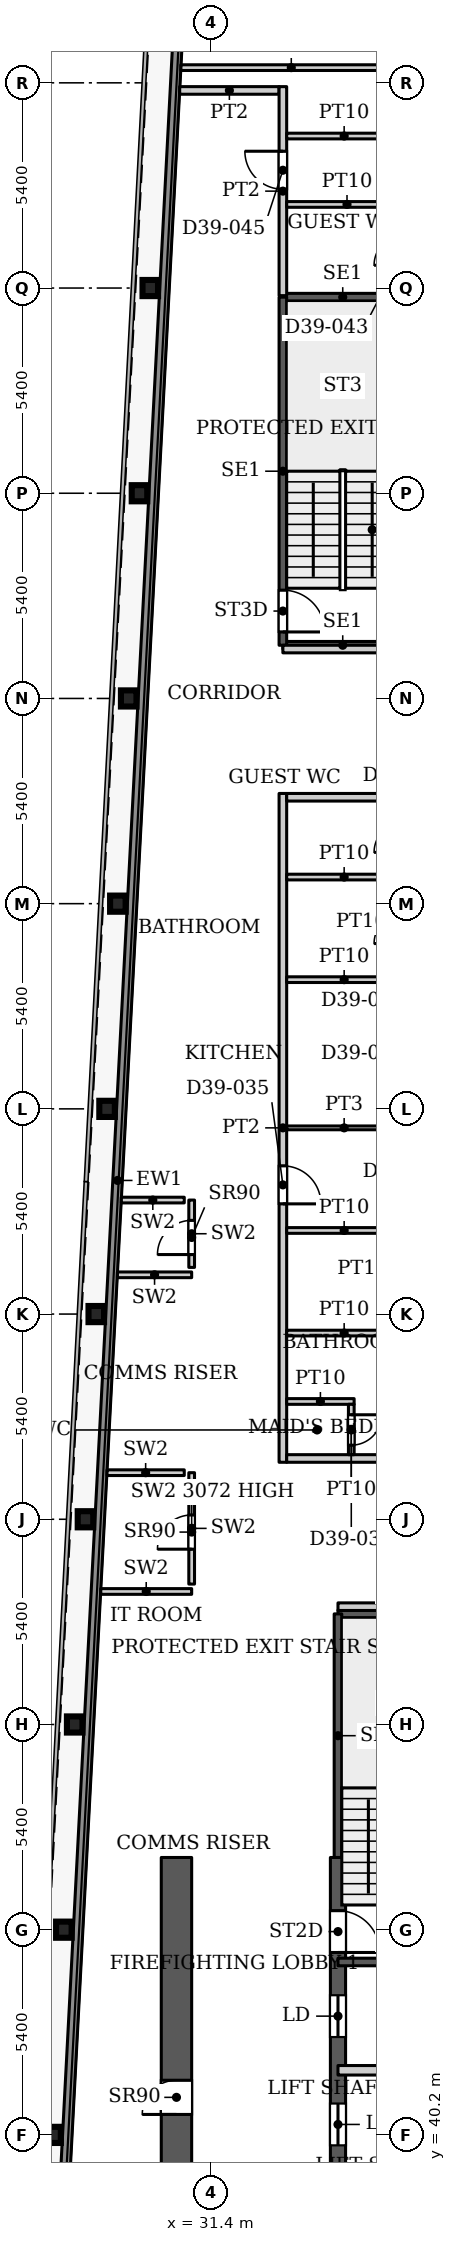
"""IFC4 building model, lengths in metres.
Left out: names, types, materials, properties, quantities, classifications, styles, units other than length and angle.
Written with IfcOpenShell. Run it as: python <this file> out.ifc"""

import sys

from ifc_helpers import new_model, si_unit, direction, frame, frame_2d, origin, origin_2d, place, context, subcontext, project, spatial, rectangle, i_section, extrude, source, transform, mapped, element, fill, save


model = new_model("IFC4")
c1 = context("Model", 3, precision=1e-05, world=origin(), true_north=direction((0.0, 1.0)))
c2 = subcontext(c1, "Body", "Model", "MODEL_VIEW")
j1 = project(units=[si_unit("LENGTHUNIT", "METRE"), si_unit("PLANEANGLEUNIT", "RADIAN")], contexts=[c1])
p1 = place(None, origin())
s1 = spatial("IfcSite", under=j1, at=p1, CompositionType="ELEMENT")
p2 = place(p1, origin())
s2 = spatial("IfcBuilding", under=s1, at=p2, CompositionType="ELEMENT")
p3 = place(p2, frame((0.0, 0.0, 172.1)))
s3 = spatial("IfcBuildingStorey", under=s2, at=p3, CompositionType="ELEMENT", Elevation=172.1)
for number, where, z_axis, x_axis in (
    (1, (27.253, 40.2, 0.0), (0.0, 0.0, 1.0), (1.0, 0.0, 0.0)),
    (2, (27.537, 45.6, 0.0), (0.0, 0.0, 1.0), (1.0, 0.0, 0.0)),
    (3, (27.822, 51.0, 0.0), (0.0, 0.0, 1.0), (1.0, 0.0, 0.0)),
    (4, (28.106, 56.4, 0.0), (0.0, 0.0, 1.0), (1.0, 0.0, 0.0)),
    (5, (28.39, 61.8, 0.0), (0.0, 0.0, 1.0), (1.0, 0.0, 0.0)),
    (6, (28.674, 67.2, 0.0), (0.0, 0.0, 1.0), (1.0, 0.0, 0.0)),
    (7, (28.958, 72.6, 0.0), (0.0, 0.0, 1.0), (1.0, 0.0, 0.0)),
    (8, (29.243, 78.0, 0.0), (0.0, 0.0, 1.0), (1.0, 0.0, 0.0)),
    (9, (29.527, 83.4, 0.0), (0.0, 0.0, 1.0), (1.0, 0.0, 0.0)),
    (10, (29.811, 88.8, 0.0), (0.0, 0.0, 1.0), (1.0, 0.0, 0.0)),
):
    element("IfcColumn", number, at=place(p3, frame(where, z_axis=z_axis, x_axis=x_axis)), inside=s3, PredefinedType="COLUMN", context=c2, shape_type="SweptSolid", body=[
        extrude(i_section(OverallWidth=0.409, OverallDepth=0.425, WebThickness=0.033, FlangeThickness=0.052, FilletRadius=0.013, at=origin_2d()), origin(), (0.0, 0.0, 1.0), 3.9),
    ])
p4 = place(p3, frame((34.75, 29.05, 0.0), z_axis=(0.0, 0.0, 1.0), x_axis=(0.0, 1.0, 0.0)))
e11 = element("IfcWall", 11, at=p4, inside=s3, PredefinedType="SHEAR", context=c2, shape_type="SweptSolid", body=[
    extrude(rectangle(XDim=18.45, YDim=0.4, at=frame_2d((9.225, 0.0))), origin(), (0.0, 0.0, 1.0), 3.9),
])
p5 = place(p4, frame((8.025, 0.0, 0.0)))
e12 = element("IfcOpeningElement", 12, at=p5, cuts=e11, PredefinedType="OPENING", context=c2, shape_type="SweptSolid", body=[
    extrude(rectangle(XDim=1.1, YDim=2.2, at=frame_2d((0.55, 1.1))), frame((0.0, 0.21, 0.0), z_axis=(0.0, -1.0, 0.0), x_axis=(1.0, 0.0, 0.0)), (0.0, 0.0, 1.0), 0.42),
])
p6 = place(p4, frame((10.875, 0.0, 0.0)))
e13 = element("IfcOpeningElement", 13, at=p6, cuts=e11, PredefinedType="OPENING", context=c2, shape_type="SweptSolid", body=[
    extrude(rectangle(XDim=1.1, YDim=2.2, at=frame_2d((0.55, 1.1))), frame((0.0, 0.21, 0.0), z_axis=(0.0, -1.0, 0.0), x_axis=(1.0, 0.0, 0.0)), (0.0, 0.0, 1.0), 0.42),
])
p7 = place(p4, frame((13.725, 0.0, 0.0)))
e14 = element("IfcOpeningElement", 14, at=p7, cuts=e11, PredefinedType="OPENING", context=c2, shape_type="SweptSolid", body=[
    extrude(rectangle(XDim=1.1, YDim=2.2, at=frame_2d((0.55, 1.1))), frame((0.0, 0.21, 0.0), z_axis=(0.0, -1.0, 0.0), x_axis=(1.0, 0.0, 0.0)), (0.0, 0.0, 1.0), 0.42),
])
p8 = place(p4, frame((15.95, 0.0, 0.0)))
e15 = element("IfcOpeningElement", 15, at=p8, cuts=e11, PredefinedType="OPENING", context=c2, shape_type="SweptSolid", body=[
    extrude(rectangle(XDim=1.1, YDim=2.2, at=frame_2d((0.55, 1.1))), frame((0.0, 0.21, 0.0), z_axis=(0.0, -1.0, 0.0), x_axis=(1.0, 0.0, 0.0)), (0.0, 0.0, 1.0), 0.42),
])
p9 = place(p3, frame((30.5, 29.05, 0.0), z_axis=(0.0, 0.0, 1.0), x_axis=(0.0, 1.0, 0.0)))
e16 = element("IfcWall", 16, at=p9, inside=s3, PredefinedType="SHEAR", context=c2, shape_type="SweptSolid", body=[
    extrude(rectangle(XDim=18.45, YDim=0.8, at=frame_2d((9.225, 0.0))), origin(), (0.0, 0.0, 1.0), 3.9),
])
p10 = place(p9, frame((1.5, 0.0, 0.0)))
e17 = element("IfcOpeningElement", 17, at=p10, cuts=e16, PredefinedType="OPENING", context=c2, shape_type="SweptSolid", body=[
    extrude(rectangle(XDim=0.9, YDim=2.2, at=frame_2d((0.45, 1.1))), frame((0.0, 0.41, 0.0), z_axis=(0.0, -1.0, 0.0), x_axis=(1.0, 0.0, 0.0)), (0.0, 0.0, 1.0), 0.82),
])
p11 = place(p9, frame((7.406, 0.0, 0.0)))
e18 = element("IfcOpeningElement", 18, at=p11, cuts=e16, PredefinedType="OPENING", context=c2, shape_type="SweptSolid", body=[
    extrude(rectangle(XDim=0.9, YDim=2.2, at=frame_2d((0.45, 1.1))), frame((0.0, 0.41, 0.0), z_axis=(0.0, -1.0, 0.0), x_axis=(1.0, 0.0, 0.0)), (0.0, 0.0, 1.0), 0.82),
])
p12 = place(p9, frame((11.688, 0.0, 0.0)))
e19 = element("IfcOpeningElement", 19, at=p12, cuts=e16, PredefinedType="OPENING", context=c2, shape_type="SweptSolid", body=[
    extrude(rectangle(XDim=0.9, YDim=2.2, at=frame_2d((0.45, 1.1))), frame((0.0, 0.41, 0.0), z_axis=(0.0, -1.0, 0.0), x_axis=(1.0, 0.0, 0.0)), (0.0, 0.0, 1.0), 0.82),
])
p13 = place(p3, frame((27.195, 31.969, 0.0), z_axis=(0.0, 0.0, 1.0), x_axis=(0.052554995867, 0.998618031286, 0.0)))
e20 = element("IfcWall", 20, at=p13, inside=s3, PredefinedType="SOLIDWALL", context=c2, shape_type="SweptSolid", body=[
    extrude(rectangle(XDim=66.787, YDim=0.25, at=frame_2d((33.394, 0.0))), origin(), (0.0, 0.0, 1.0), 3.75),
])
for number, where, z_axis, x_axis in (
    (21, (34.75, 44.75, 0.0), (0.0, 0.0, 1.0), (1.0, 0.0, 0.0)),
    (22, (34.75, 53.91, 0.0), (0.0, 0.0, 1.0), (1.0, 0.0, 0.0)),
):
    element("IfcWall", number, at=place(p3, frame(where, z_axis=z_axis, x_axis=x_axis)), inside=s3, PredefinedType="SHEAR", context=c2, shape_type="SweptSolid", body=[
        extrude(rectangle(XDim=3.15, YDim=0.2, at=frame_2d((1.575, 0.0))), origin(), (0.0, 0.0, 1.0), 3.9),
    ])
p14 = place(p3, frame((34.75, 47.5, 0.0), z_axis=(0.0, 0.0, 1.0), x_axis=(0.0, 1.0, 0.0)))
e23 = element("IfcWall", 23, at=p14, inside=s3, PredefinedType="SHEAR", context=c2, shape_type="SweptSolid", body=[
    extrude(rectangle(XDim=6.41, YDim=0.2, at=frame_2d((3.205, 0.0))), origin(), (0.0, 0.0, 1.0), 3.9),
])
for number, where, z_axis, x_axis in (
    (24, (33.3, 79.4, 0.0), (0.0, 0.0, 1.0), (1.0, 0.0, 0.0)),
    (25, (33.3, 88.56, 0.0), (0.0, 0.0, 1.0), (1.0, 0.0, 0.0)),
):
    element("IfcWall", number, at=place(p3, frame(where, z_axis=z_axis, x_axis=x_axis)), inside=s3, PredefinedType="SHEAR", context=c2, shape_type="SweptSolid", body=[
        extrude(rectangle(XDim=3.15, YDim=0.2, at=frame_2d((1.575, 0.0))), origin(), (0.0, 0.0, 1.0), 3.9),
    ])
p15 = place(p3, frame((33.3, 79.4, 0.0), z_axis=(0.0, 0.0, 1.0), x_axis=(0.0, 1.0, 0.0)))
e26 = element("IfcWall", 26, at=p15, inside=s3, PredefinedType="SHEAR", context=c2, shape_type="SweptSolid", body=[
    extrude(rectangle(XDim=9.16, YDim=0.2, at=frame_2d((4.58, 0.0))), origin(), (0.0, 0.0, 1.0), 3.9),
])
p16 = place(p15, frame((0.35, 0.0, 0.0)))
e27 = element("IfcOpeningElement", 27, at=p16, cuts=e26, PredefinedType="OPENING", context=c2, shape_type="SweptSolid", body=[
    extrude(rectangle(XDim=1.1, YDim=2.2, at=frame_2d((0.55, 1.1))), frame((0.0, 0.11, 0.0), z_axis=(0.0, -1.0, 0.0), x_axis=(1.0, 0.0, 0.0)), (0.0, 0.0, 1.0), 0.22),
])
p17 = place(p3, frame((34.75, 41.9, 0.0), z_axis=(0.0, 0.0, 1.0), x_axis=(1.0, 0.0, 0.0)))
e28 = element("IfcWall", 28, at=p17, inside=s3, PredefinedType="PARTITIONING", context=c2, shape_type="SweptSolid", body=[
    extrude(rectangle(XDim=3.25, YDim=0.25, at=frame_2d((1.625, 0.0))), origin(), (0.0, 0.0, 1.0), 3.9),
])
p18 = place(p3, frame((28.508, 54.5, 0.0), z_axis=(0.0, 0.0, 1.0), x_axis=(1.0, 0.0, 0.0)))
e29 = element("IfcWall", 29, at=p18, inside=s3, PredefinedType="PARTITIONING", context=c2, shape_type="SweptSolid", body=[
    extrude(rectangle(XDim=2.392, YDim=0.15, at=frame_2d((1.196, 0.0))), origin(), (0.0, 0.0, 1.0), 3.9),
])
p19 = place(p3, frame((30.9, 54.695, 0.0), z_axis=(0.0, 0.0, 1.0), x_axis=(0.0, 1.0, 0.0)))
e30 = element("IfcWall", 30, at=p19, inside=s3, PredefinedType="PARTITIONING", context=c2, shape_type="SweptSolid", body=[
    extrude(rectangle(XDim=2.931, YDim=0.15, at=frame_2d((1.465, 0.0))), origin(), (0.0, 0.0, 1.0), 3.072),
])
p20 = place(p19, frame((0.918, 0.0, 0.0)))
e31 = element("IfcOpeningElement", 31, at=p20, cuts=e30, PredefinedType="OPENING", context=c2, shape_type="SweptSolid", body=[
    extrude(rectangle(XDim=0.9, YDim=2.2, at=frame_2d((0.45, 1.1))), frame((0.0, 0.085, 0.0), z_axis=(0.0, -1.0, 0.0), x_axis=(1.0, 0.0, 0.0)), (0.0, 0.0, 1.0), 0.17),
])
p21 = place(p3, frame((28.673, 57.626, 0.0), z_axis=(0.0, 0.0, 1.0), x_axis=(1.0, 0.0, 0.0)))
e32 = element("IfcWall", 32, at=p21, inside=s3, PredefinedType="PARTITIONING", context=c2, shape_type="SweptSolid", body=[
    extrude(rectangle(XDim=2.032, YDim=0.15, at=frame_2d((1.016, 0.0))), origin(), (0.0, 0.0, 1.0), 3.9),
])
p22 = place(p3, frame((28.947, 62.833, 0.0), z_axis=(0.0, 0.0, 1.0), x_axis=(1.0, 0.0, 0.0)))
e33 = element("IfcWall", 33, at=p22, inside=s3, PredefinedType="PARTITIONING", context=c2, shape_type="SweptSolid", body=[
    extrude(rectangle(XDim=1.953, YDim=0.15, at=frame_2d((0.977, 0.0))), origin(), (0.0, 0.0, 1.0), 3.9),
])
p23 = place(p3, frame((30.9, 63.028, 0.0), z_axis=(0.0, 0.0, 1.0), x_axis=(0.0, 1.0, 0.0)))
e34 = element("IfcWall", 34, at=p23, inside=s3, PredefinedType="PARTITIONING", context=c2, shape_type="SweptSolid", body=[
    extrude(rectangle(XDim=1.772, YDim=0.15, at=frame_2d((0.886, 0.0))), origin(), (0.0, 0.0, 1.0), 3.9),
])
p24 = place(p23, frame((0.338, 0.0, 0.0)))
e35 = element("IfcOpeningElement", 35, at=p24, cuts=e34, PredefinedType="OPENING", context=c2, shape_type="SweptSolid", body=[
    extrude(rectangle(XDim=0.9, YDim=2.2, at=frame_2d((0.45, 1.1))), frame((0.0, 0.085, 0.0), z_axis=(0.0, -1.0, 0.0), x_axis=(1.0, 0.0, 0.0)), (0.0, 0.0, 1.0), 0.17),
])
p25 = place(p3, frame((29.05, 64.8, 0.0), z_axis=(0.0, 0.0, 1.0), x_axis=(1.0, 0.0, 0.0)))
e36 = element("IfcWall", 36, at=p25, inside=s3, PredefinedType="PARTITIONING", context=c2, shape_type="SweptSolid", body=[
    extrude(rectangle(XDim=1.655, YDim=0.15, at=frame_2d((0.828, 0.0))), origin(), (0.0, 0.0, 1.0), 3.9),
])
p26 = place(p3, frame((30.617, 94.6, 0.0), z_axis=(0.0, 0.0, 1.0), x_axis=(1.0, 0.0, 0.0)))
e37 = element("IfcWall", 37, at=p26, inside=s3, PredefinedType="PARTITIONING", context=c2, shape_type="SweptSolid", body=[
    extrude(rectangle(XDim=5.808, YDim=0.15, at=frame_2d((2.904, 0.0))), origin(), (0.0, 0.0, 1.0), 3.6),
])
p27 = place(p3, frame((30.585, 94.0, 0.0), z_axis=(0.0, 0.0, 1.0), x_axis=(1.0, 0.0, 0.0)))
e38 = element("IfcWall", 38, at=p27, inside=s3, PredefinedType="PARTITIONING", context=c2, shape_type="SweptSolid", body=[
    extrude(rectangle(XDim=2.615, YDim=0.2, at=frame_2d((1.308, 0.0))), origin(), (0.0, 0.0, 1.0), 3.6),
])
p28 = place(p3, frame((33.3, 57.9, 0.0), z_axis=(0.0, 0.0, 1.0), x_axis=(0.0, 1.0, 0.0)))
e39 = element("IfcWall", 39, at=p28, inside=s3, PredefinedType="PARTITIONING", context=c2, shape_type="SweptSolid", body=[
    extrude(rectangle(XDim=17.6, YDim=0.2, at=frame_2d((8.8, 0.0))), origin(), (0.0, 0.0, 1.0), 3.6),
])
p29 = place(p28, frame((6.8, 0.0, 0.0)))
e40 = element("IfcOpeningElement", 40, at=p29, cuts=e39, PredefinedType="OPENING", context=c2, shape_type="SweptSolid", body=[
    extrude(rectangle(XDim=1.0, YDim=2.1, at=frame_2d((0.5, 1.05))), frame((0.0, 0.11, 0.0), z_axis=(0.0, -1.0, 0.0), x_axis=(1.0, 0.0, 0.0)), (0.0, 0.0, 1.0), 0.22),
])
p30 = place(p3, frame((33.3, 79.3, 0.0), z_axis=(0.0, 0.0, 1.0), x_axis=(1.0, 0.0, 0.0)))
e41 = element("IfcWall", 41, at=p30, inside=s3, PredefinedType="PARTITIONING", context=c2, shape_type="SweptSolid", body=[
    extrude(rectangle(XDim=12.6, YDim=0.2, at=frame_2d((6.3, 0.0))), origin(), (0.0, 0.0, 1.0), 3.6),
])
p31 = place(p30, frame((5.795, 0.0, 0.0)))
e42 = element("IfcOpeningElement", 42, at=p31, cuts=e41, PredefinedType="OPENING", context=c2, shape_type="SweptSolid", body=[
    extrude(rectangle(XDim=1.0, YDim=2.1, at=frame_2d((0.5, 1.05))), frame((0.0, 0.11, 0.0), z_axis=(0.0, -1.0, 0.0), x_axis=(1.0, 0.0, 0.0)), (0.0, 0.0, 1.0), 0.22),
])
p32 = place(p3, frame((33.3, 88.6, 0.0), z_axis=(0.0, 0.0, 1.0), x_axis=(0.0, 1.0, 0.0)))
e43 = element("IfcWall", 43, at=p32, inside=s3, PredefinedType="PARTITIONING", context=c2, shape_type="SweptSolid", body=[
    extrude(rectangle(XDim=5.5, YDim=0.2, at=frame_2d((2.75, 0.0))), origin(), (0.0, 0.0, 1.0), 3.6),
])
p33 = place(p32, frame((2.8, 0.0, 0.0)))
e44 = element("IfcOpeningElement", 44, at=p33, cuts=e43, PredefinedType="OPENING", context=c2, shape_type="SweptSolid", body=[
    extrude(rectangle(XDim=1.0, YDim=2.1, at=frame_2d((0.5, 1.05))), frame((0.0, 0.11, 0.0), z_axis=(0.0, -1.0, 0.0), x_axis=(1.0, 0.0, 0.0)), (0.0, 0.0, 1.0), 0.22),
])
p34 = place(p3, frame((33.4, 58.0, 0.0), z_axis=(0.0, 0.0, 1.0), x_axis=(1.0, 0.0, 0.0)))
e45 = element("IfcWall", 45, at=p34, inside=s3, PredefinedType="PARTITIONING", context=c2, shape_type="SweptSolid", body=[
    extrude(rectangle(XDim=12.5, YDim=0.2, at=frame_2d((6.25, 0.0))), origin(), (0.0, 0.0, 1.0), 3.6),
])
p35 = place(p3, frame((33.4, 59.5, 0.0), z_axis=(0.0, 0.0, 1.0), x_axis=(1.0, 0.0, 0.0)))
e46 = element("IfcWall", 46, at=p35, inside=s3, PredefinedType="PARTITIONING", context=c2, shape_type="SweptSolid", body=[
    extrude(rectangle(XDim=1.775, YDim=0.15, at=frame_2d((0.888, 0.0))), origin(), (0.0, 0.0, 1.0), 3.6),
])
for number, where, z_axis, x_axis in (
    (47, (33.4, 61.3, 0.0), (0.0, 0.0, 1.0), (1.0, 0.0, 0.0)),
    (48, (33.4, 64.0, 0.0), (0.0, 0.0, 1.0), (1.0, 0.0, 0.0)),
):
    element("IfcWall", number, at=place(p3, frame(where, z_axis=z_axis, x_axis=x_axis)), inside=s3, PredefinedType="PARTITIONING", context=c2, shape_type="SweptSolid", body=[
        extrude(rectangle(XDim=3.025, YDim=0.15, at=frame_2d((1.513, 0.0))), origin(), (0.0, 0.0, 1.0), 3.6),
    ])
p36 = place(p3, frame((33.4, 66.7, 0.0), z_axis=(0.0, 0.0, 1.0), x_axis=(1.0, 0.0, 0.0)))
e49 = element("IfcWall", 49, at=p36, inside=s3, PredefinedType="PARTITIONING", context=c2, shape_type="SweptSolid", body=[
    extrude(rectangle(XDim=3.025, YDim=0.1, at=frame_2d((1.513, 0.0))), origin(), (0.0, 0.0, 1.0), 3.6),
])
for number, where, z_axis, x_axis in (
    (50, (33.4, 70.6, 0.0), (0.0, 0.0, 1.0), (1.0, 0.0, 0.0)),
    (51, (33.4, 73.3, 0.0), (0.0, 0.0, 1.0), (1.0, 0.0, 0.0)),
):
    element("IfcWall", number, at=place(p3, frame(where, z_axis=z_axis, x_axis=x_axis)), inside=s3, PredefinedType="PARTITIONING", context=c2, shape_type="SweptSolid", body=[
        extrude(rectangle(XDim=3.025, YDim=0.15, at=frame_2d((1.513, 0.0))), origin(), (0.0, 0.0, 1.0), 3.6),
    ])
p37 = place(p3, frame((33.4, 75.4, 0.0), z_axis=(0.0, 0.0, 1.0), x_axis=(1.0, 0.0, 0.0)))
e52 = element("IfcWall", 52, at=p37, inside=s3, PredefinedType="PARTITIONING", context=c2, shape_type="SweptSolid", body=[
    extrude(rectangle(XDim=12.5, YDim=0.2, at=frame_2d((6.25, 0.0))), origin(), (0.0, 0.0, 1.0), 3.6),
])
p38 = place(p3, frame((33.4, 91.0, 0.0), z_axis=(0.0, 0.0, 1.0), x_axis=(1.0, 0.0, 0.0)))
e53 = element("IfcWall", 53, at=p38, inside=s3, PredefinedType="PARTITIONING", context=c2, shape_type="SweptSolid", body=[
    extrude(rectangle(XDim=3.175, YDim=0.15, at=frame_2d((1.587, 0.0))), origin(), (0.0, 0.0, 1.0), 3.6),
])
p39 = place(p3, frame((33.4, 92.8, 0.0), z_axis=(0.0, 0.0, 1.0), x_axis=(1.0, 0.0, 0.0)))
e54 = element("IfcWall", 54, at=p39, inside=s3, PredefinedType="PARTITIONING", context=c2, shape_type="SweptSolid", body=[
    extrude(rectangle(XDim=3.025, YDim=0.15, at=frame_2d((1.513, 0.0))), origin(), (0.0, 0.0, 1.0), 3.6),
])
p40 = place(p3, frame((34.75, 54.1, 0.0), z_axis=(0.0, 0.0, 1.0), x_axis=(1.0, 0.0, 0.0)))
e55 = element("IfcWall", 55, at=p40, inside=s3, PredefinedType="PARTITIONING", context=c2, shape_type="SweptSolid", body=[
    extrude(rectangle(XDim=11.15, YDim=0.2, at=frame_2d((5.575, 0.0))), origin(), (0.0, 0.0, 1.0), 3.6),
])
p41 = place(p40, frame((5.075, 0.0, 0.0)))
e56 = element("IfcOpeningElement", 56, at=p41, cuts=e55, PredefinedType="OPENING", context=c2, shape_type="SweptSolid", body=[
    extrude(rectangle(XDim=1.0, YDim=2.1, at=frame_2d((0.5, 1.05))), frame((0.0, 0.11, 0.0), z_axis=(0.0, -1.0, 0.0), x_axis=(1.0, 0.0, 0.0)), (0.0, 0.0, 1.0), 0.22),
])
p42 = place(p3, frame((35.1, 58.1, 0.0), z_axis=(0.0, 0.0, 1.0), x_axis=(0.0, 1.0, 0.0)))
e57 = element("IfcWall", 57, at=p42, inside=s3, PredefinedType="PARTITIONING", context=c2, shape_type="SweptSolid", body=[
    extrude(rectangle(XDim=1.325, YDim=0.15, at=frame_2d((0.663, 0.0))), origin(), (0.0, 0.0, 1.0), 3.6),
])
p43 = place(p42, frame((0.25, 0.0, 0.0)))
e58 = element("IfcOpeningElement", 58, at=p43, cuts=e57, PredefinedType="OPENING", context=c2, shape_type="SweptSolid", body=[
    extrude(rectangle(XDim=0.8, YDim=2.1, at=frame_2d((0.4, 1.05))), frame((0.0, 0.085, 0.0), z_axis=(0.0, -1.0, 0.0), x_axis=(1.0, 0.0, 0.0)), (0.0, 0.0, 1.0), 0.17),
])
m1 = source(origin(), c2, "Body", "SweptSolid", [
    extrude(rectangle(XDim=1.1, YDim=2.2, at=frame_2d((0.55, 1.1))), frame((0.0, 0.025, 0.0), z_axis=(0.0, -1.0, 0.0), x_axis=(1.0, 0.0, 0.0)), (0.0, 0.0, 1.0), 0.05),
])
p44 = place(p6, origin())
e59 = element("IfcDoor", 59, at=p44, inside=s3, OperationType="SLIDING_TO_LEFT", PredefinedType="DOOR", context=c2, shape_type="MappedRepresentation", body=[
    mapped(m1, transform((0.0, 0.0, 0.0), x_axis=(1.0, 0.0, 0.0), y_axis=(0.0, 1.0, 0.0), z_axis=(0.0, 0.0, 1.0), scale=1.0)),
])
fill(e13, e59)
p45 = place(p7, origin())
e60 = element("IfcDoor", 60, at=p45, inside=s3, OperationType="SLIDING_TO_LEFT", PredefinedType="DOOR", context=c2, shape_type="MappedRepresentation", body=[
    mapped(m1, transform((0.0, 0.0, 0.0), x_axis=(1.0, 0.0, 0.0), y_axis=(0.0, 1.0, 0.0), z_axis=(0.0, 0.0, 1.0), scale=1.0)),
])
fill(e14, e60)
m2 = source(origin(), c2, "Body", "SweptSolid", [
    extrude(rectangle(XDim=0.9, YDim=2.2, at=frame_2d((0.45, 1.1))), frame((0.0, 0.025, 0.0), z_axis=(0.0, -1.0, 0.0), x_axis=(1.0, 0.0, 0.0)), (0.0, 0.0, 1.0), 0.05),
])
p46 = place(p12, origin())
e61 = element("IfcDoor", 61, at=p46, inside=s3, OperationType="SINGLE_SWING_LEFT", PredefinedType="DOOR", context=c2, shape_type="MappedRepresentation", body=[
    mapped(m2, transform((0.0, 0.0, 0.0), x_axis=(1.0, 0.0, 0.0), y_axis=(0.0, 1.0, 0.0), z_axis=(0.0, 0.0, 1.0), scale=1.0)),
])
fill(e19, e61)
p47 = place(p20, origin())
e62 = element("IfcDoor", 62, at=p47, inside=s3, OperationType="SINGLE_SWING_LEFT", PredefinedType="DOOR", context=c2, shape_type="MappedRepresentation", body=[
    mapped(m2, transform((0.0, 0.0, 0.0), x_axis=(1.0, 0.0, 0.0), y_axis=(0.0, 1.0, 0.0), z_axis=(0.0, 0.0, 1.0), scale=1.0)),
])
fill(e31, e62)
p48 = place(p24, origin())
e63 = element("IfcDoor", 63, at=p48, inside=s3, OperationType="SINGLE_SWING_LEFT", PredefinedType="DOOR", context=c2, shape_type="MappedRepresentation", body=[
    mapped(m2, transform((0.0, 0.0, 0.0), x_axis=(1.0, 0.0, 0.0), y_axis=(0.0, 1.0, 0.0), z_axis=(0.0, 0.0, 1.0), scale=1.0)),
])
fill(e35, e63)
m3 = source(origin(), c2, "Body", "SweptSolid", [
    extrude(rectangle(XDim=1.1, YDim=2.2, at=frame_2d((0.55, 1.1))), frame((0.0, 0.025, 0.0), z_axis=(0.0, -1.0, 0.0), x_axis=(1.0, 0.0, 0.0)), (0.0, 0.0, 1.0), 0.05),
])
p49 = place(p8, origin())
e64 = element("IfcDoor", 64, at=p49, inside=s3, OperationType="SINGLE_SWING_RIGHT", PredefinedType="DOOR", context=c2, shape_type="MappedRepresentation", body=[
    mapped(m3, transform((0.0, 0.0, 0.0), x_axis=(1.0, 0.0, 0.0), y_axis=(0.0, 1.0, 0.0), z_axis=(0.0, 0.0, 1.0), scale=1.0)),
])
fill(e15, e64)
p50 = place(p16, origin())
e65 = element("IfcDoor", 65, at=p50, inside=s3, OperationType="SINGLE_SWING_RIGHT", PredefinedType="DOOR", context=c2, shape_type="MappedRepresentation", body=[
    mapped(m3, transform((0.0, 0.0, 0.0), x_axis=(1.0, 0.0, 0.0), y_axis=(0.0, 1.0, 0.0), z_axis=(0.0, 0.0, 1.0), scale=1.0)),
])
fill(e27, e65)
m4 = source(origin(), c2, "Body", "SweptSolid", [
    extrude(rectangle(XDim=1.0, YDim=2.1, at=frame_2d((0.5, 1.05))), frame((0.0, 0.025, 0.0), z_axis=(0.0, -1.0, 0.0), x_axis=(1.0, 0.0, 0.0)), (0.0, 0.0, 1.0), 0.05),
])
p51 = place(p29, origin())
e66 = element("IfcDoor", 66, at=p51, inside=s3, OperationType="SINGLE_SWING_RIGHT", PredefinedType="DOOR", context=c2, shape_type="MappedRepresentation", body=[
    mapped(m4, transform((0.0, 0.0, 0.0), x_axis=(1.0, 0.0, 0.0), y_axis=(0.0, 1.0, 0.0), z_axis=(0.0, 0.0, 1.0), scale=1.0)),
])
fill(e40, e66)
m5 = source(origin(), c2, "Body", "SweptSolid", [
    extrude(rectangle(XDim=0.8, YDim=2.1, at=frame_2d((0.4, 1.05))), frame((0.0, 0.025, 0.0), z_axis=(0.0, -1.0, 0.0), x_axis=(1.0, 0.0, 0.0)), (0.0, 0.0, 1.0), 0.05),
])
p52 = place(p43, origin())
e67 = element("IfcDoor", 67, at=p52, inside=s3, OperationType="SINGLE_SWING_RIGHT", PredefinedType="DOOR", context=c2, shape_type="MappedRepresentation", body=[
    mapped(m5, transform((0.0, 0.0, 0.0), x_axis=(1.0, 0.0, 0.0), y_axis=(0.0, 1.0, 0.0), z_axis=(0.0, 0.0, 1.0), scale=1.0)),
])
fill(e58, e67)
p53 = place(p33, origin())
e68 = element("IfcDoor", 68, at=p53, inside=s3, OperationType="SINGLE_SWING_LEFT", PredefinedType="DOOR", context=c2, shape_type="MappedRepresentation", body=[
    mapped(m4, transform((0.0, 0.0, 0.0), x_axis=(1.0, 0.0, 0.0), y_axis=(0.0, 1.0, 0.0), z_axis=(0.0, 0.0, 1.0), scale=1.0)),
])
fill(e44, e68)
save(model, sys.argv[1])
